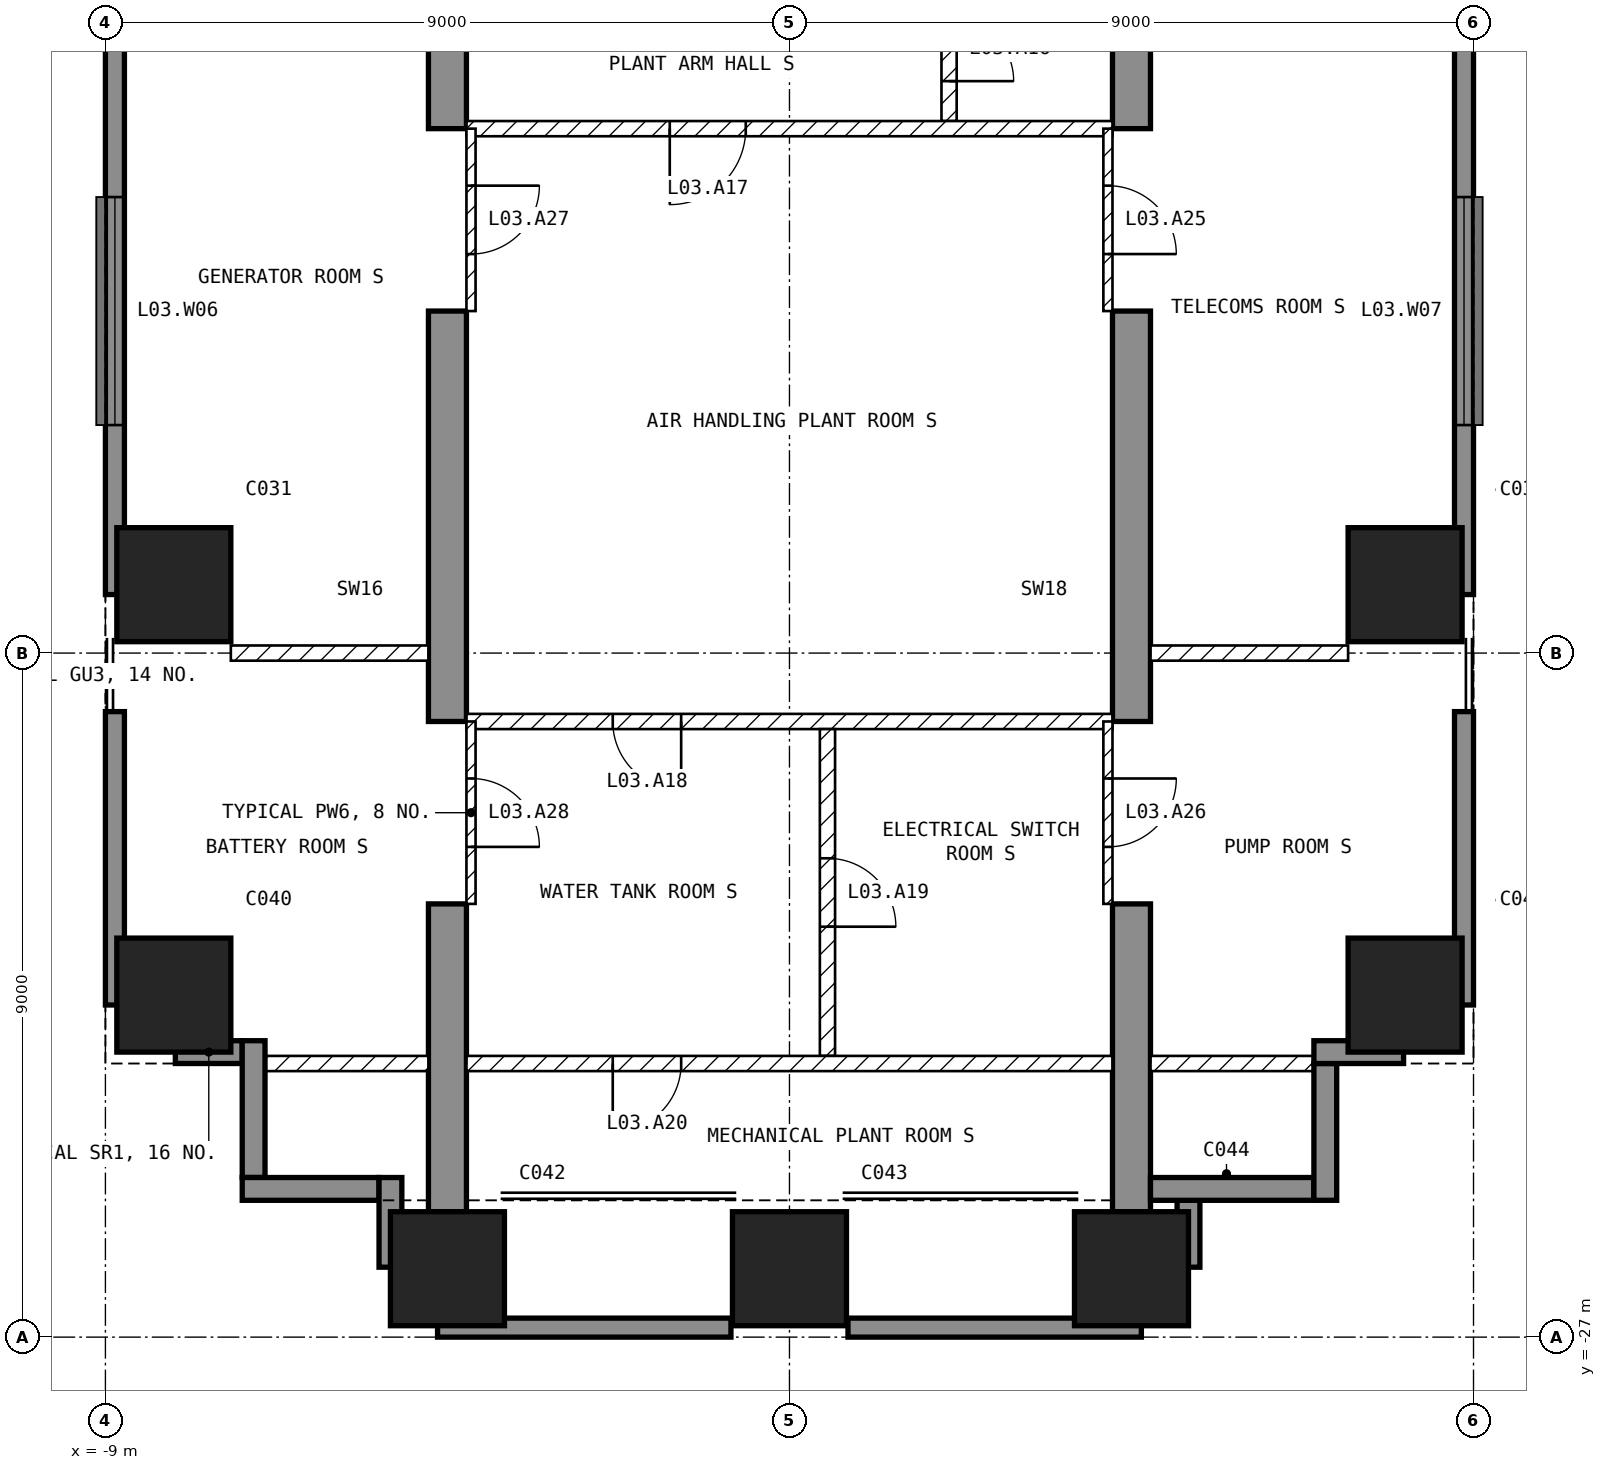
"""IFC4 building model, lengths in metres.
Left out: names, types, materials, properties, quantities, classifications, styles, units other than length and angle.
Written with IfcOpenShell. Run it as: python <this file> out.ifc"""

import sys

from ifc_helpers import new_model, si_unit, direction, frame, frame_2d, origin, origin_2d, place, context, subcontext, project, spatial, polyline, rectangle, outline, extrude, element, fill, save


model = new_model("IFC4")
c1 = context("Model", 3, precision=1e-05, world=origin(), true_north=direction((0.0, 1.0)))
c2 = subcontext(c1, "Body", "Model", "MODEL_VIEW")
j1 = project(units=[si_unit("LENGTHUNIT", "METRE"), si_unit("PLANEANGLEUNIT", "RADIAN")], contexts=[c1])
p1 = place(None, origin())
s1 = spatial("IfcSite", under=j1, at=p1, CompositionType="ELEMENT")
p2 = place(p1, origin())
s2 = spatial("IfcBuilding", under=s1, at=p2, CompositionType="ELEMENT")
p3 = place(p2, frame((0.0, 0.0, 27.0)))
s3 = spatial("IfcBuildingStorey", under=s2, at=p3, CompositionType="ELEMENT", Elevation=27.0)
for number, where, z_axis, x_axis in (
    (1, (-8.1, -22.5, -0.45), (0.0, 0.0, 1.0), (1.0, 0.0, 0.0)),
    (2, (-8.1, -17.1, -0.45), (0.0, 0.0, 1.0), (1.0, 0.0, 0.0)),
    (3, (-4.5, -26.1, -0.45), (0.0, 0.0, 1.0), (1.0, 0.0, 0.0)),
    (4, (0.0, -26.1, -0.45), (0.0, 0.0, 1.0), (1.0, 0.0, 0.0)),
    (5, (4.5, -26.1, -0.45), (0.0, 0.0, 1.0), (1.0, 0.0, 0.0)),
    (6, (8.1, -22.5, -0.45), (0.0, 0.0, 1.0), (1.0, 0.0, 0.0)),
    (7, (8.1, -17.1, -0.45), (0.0, 0.0, 1.0), (1.0, 0.0, 0.0)),
):
    element("IfcColumn", number, at=place(p3, frame(where, z_axis=z_axis, x_axis=x_axis)), inside=s3, PredefinedType="COLUMN", context=c2, shape_type="SweptSolid", body=[
        extrude(rectangle(XDim=1.5, YDim=1.5, at=origin_2d()), origin(), (0.0, 0.0, 1.0), 5.15),
    ])
for number, where, z_axis, x_axis in (
    (8, (-4.75, -25.35, -0.45), (1.0, 0.0, 0.0), (0.0, 1.0, 0.0)),
    (9, (4.25, -25.35, -0.45), (1.0, 0.0, 0.0), (0.0, 1.0, 0.0)),
):
    element("IfcWall", number, at=place(p3, frame(where, z_axis=z_axis, x_axis=x_axis)), inside=s3, PredefinedType="SHEAR", context=c2, shape_type="SweptSolid", body=[
        extrude(outline(polyline([(0.0, 0.0), (4.05, 0.0), (4.05, 2.85), (6.45, 2.85), (6.45, 0.0), (11.85, 0.0), (11.85, 2.85), (14.25, 2.85), (14.25, 0.0), (16.35, 0.0), (16.35, 5.15), (0.0, 5.15), (0.0, 0.0)])), origin(), (0.0, 0.0, 1.0), 0.5),
    ])
p4 = place(p3, frame((-8.875, -9.77, 0.0), z_axis=(0.0, 0.0, 1.0), x_axis=(0.0, -1.0, 0.0)))
e10 = element("IfcWall", 10, at=p4, inside=s3, PredefinedType="SOLIDWALL", context=c2, shape_type="SweptSolid", body=[
    extrude(rectangle(XDim=7.46, YDim=0.25, at=frame_2d((3.73, 0.0))), origin(), (0.0, 0.0, 1.0), 4.7),
])
p5 = place(p4, frame((2.23, 0.0, 1.0)))
e11 = element("IfcOpeningElement", 11, at=p5, cuts=e10, PredefinedType="OPENING", context=c2, shape_type="SweptSolid", body=[
    extrude(rectangle(XDim=3.0, YDim=2.4, at=frame_2d((1.5, 1.2))), frame((0.0, 0.135, 0.0), z_axis=(0.0, -1.0, 0.0), x_axis=(1.0, 0.0, 0.0)), (0.0, 0.0, 1.0), 0.27),
])
for number, where, z_axis, x_axis in (
    (12, (-8.875, -18.77, 0.0), (0.0, 0.0, 1.0), (0.0, -1.0, 0.0)),
    (13, (-4.63, -26.875, 0.0), (0.0, 0.0, 1.0), (1.0, 0.0, 0.0)),
    (14, (0.77, -26.875, 0.0), (0.0, 0.0, 1.0), (1.0, 0.0, 0.0)),
    (15, (8.875, -22.63, 0.0), (0.0, 0.0, 1.0), (0.0, 1.0, 0.0)),
):
    element("IfcWall", number, at=place(p3, frame(where, z_axis=z_axis, x_axis=x_axis)), inside=s3, PredefinedType="SOLIDWALL", context=c2, shape_type="SweptSolid", body=[
        extrude(rectangle(XDim=3.86, YDim=0.25, at=frame_2d((1.93, 0.0))), origin(), (0.0, 0.0, 1.0), 4.7),
    ])
p6 = place(p3, frame((8.875, -17.23, 0.0), z_axis=(0.0, 0.0, 1.0), x_axis=(0.0, 1.0, 0.0)))
e16 = element("IfcWall", 16, at=p6, inside=s3, PredefinedType="SOLIDWALL", context=c2, shape_type="SweptSolid", body=[
    extrude(rectangle(XDim=7.46, YDim=0.25, at=frame_2d((3.73, 0.0))), origin(), (0.0, 0.0, 1.0), 4.7),
])
p7 = place(p6, frame((2.23, 0.0, 1.0)))
e17 = element("IfcOpeningElement", 17, at=p7, cuts=e16, PredefinedType="OPENING", context=c2, shape_type="SweptSolid", body=[
    extrude(rectangle(XDim=3.0, YDim=2.4, at=frame_2d((1.5, 1.2))), frame((0.0, 0.135, 0.0), z_axis=(0.0, -1.0, 0.0), x_axis=(1.0, 0.0, 0.0)), (0.0, 0.0, 1.0), 0.27),
])
p8 = place(p3, frame((5.25, -26.08, 0.0), z_axis=(0.0, 0.0, 1.0), x_axis=(0.0, 1.0, 0.0)))
e18 = element("IfcWall", 18, at=p8, inside=s3, PredefinedType="SOLIDWALL", context=c2, shape_type="SweptSolid", body=[
    extrude(rectangle(XDim=0.88, YDim=0.3, at=frame_2d((0.44, 0.0))), origin(), (0.0, 0.0, 1.0), 4.7),
])
p9 = place(p3, frame((4.75, -25.05, 0.0), z_axis=(0.0, 0.0, 1.0), x_axis=(1.0, 0.0, 0.0)))
e19 = element("IfcWall", 19, at=p9, inside=s3, PredefinedType="SOLIDWALL", context=c2, shape_type="SweptSolid", body=[
    extrude(rectangle(XDim=2.15, YDim=0.3, at=frame_2d((1.075, 0.0))), origin(), (0.0, 0.0, 1.0), 4.7),
])
p10 = place(p3, frame((7.05, -25.2, 0.0), z_axis=(0.0, 0.0, 1.0), x_axis=(0.0, 1.0, 0.0)))
e20 = element("IfcWall", 20, at=p10, inside=s3, PredefinedType="SOLIDWALL", context=c2, shape_type="SweptSolid", body=[
    extrude(rectangle(XDim=1.8, YDim=0.3, at=frame_2d((0.9, 0.0))), origin(), (0.0, 0.0, 1.0), 4.7),
])
p11 = place(p3, frame((6.9, -23.25, 0.0), z_axis=(0.0, 0.0, 1.0), x_axis=(1.0, 0.0, 0.0)))
e21 = element("IfcWall", 21, at=p11, inside=s3, PredefinedType="SOLIDWALL", context=c2, shape_type="SweptSolid", body=[
    extrude(rectangle(XDim=1.18, YDim=0.3, at=frame_2d((0.59, 0.0))), origin(), (0.0, 0.0, 1.0), 4.7),
])
p12 = place(p3, frame((-8.08, -23.25, 0.0), z_axis=(0.0, 0.0, 1.0), x_axis=(1.0, 0.0, 0.0)))
e22 = element("IfcWall", 22, at=p12, inside=s3, PredefinedType="SOLIDWALL", context=c2, shape_type="SweptSolid", body=[
    extrude(rectangle(XDim=0.88, YDim=0.3, at=frame_2d((0.44, 0.0))), origin(), (0.0, 0.0, 1.0), 4.7),
])
p13 = place(p3, frame((-7.05, -23.1, 0.0), z_axis=(0.0, 0.0, 1.0), x_axis=(0.0, -1.0, 0.0)))
e23 = element("IfcWall", 23, at=p13, inside=s3, PredefinedType="SOLIDWALL", context=c2, shape_type="SweptSolid", body=[
    extrude(rectangle(XDim=1.8, YDim=0.3, at=frame_2d((0.9, 0.0))), origin(), (0.0, 0.0, 1.0), 4.7),
])
p14 = place(p3, frame((-7.2, -25.05, 0.0), z_axis=(0.0, 0.0, 1.0), x_axis=(1.0, 0.0, 0.0)))
e24 = element("IfcWall", 24, at=p14, inside=s3, PredefinedType="SOLIDWALL", context=c2, shape_type="SweptSolid", body=[
    extrude(rectangle(XDim=1.8, YDim=0.3, at=frame_2d((0.9, 0.0))), origin(), (0.0, 0.0, 1.0), 4.7),
])
p15 = place(p3, frame((-5.25, -24.9, 0.0), z_axis=(0.0, 0.0, 1.0), x_axis=(0.0, -1.0, 0.0)))
e25 = element("IfcWall", 25, at=p15, inside=s3, PredefinedType="SOLIDWALL", context=c2, shape_type="SweptSolid", body=[
    extrude(rectangle(XDim=1.18, YDim=0.3, at=frame_2d((0.59, 0.0))), origin(), (0.0, 0.0, 1.0), 4.7),
])
p16 = place(p3, frame((2.1, -9.1, 0.0), z_axis=(0.0, 0.0, 1.0), x_axis=(0.0, -1.0, 0.0)))
e26 = element("IfcWall", 26, at=p16, inside=s3, PredefinedType="PARTITIONING", context=c2, shape_type="SweptSolid", body=[
    extrude(rectangle(XDim=1.9, YDim=0.2, at=frame_2d((0.95, 0.0))), origin(), (0.0, 0.0, 1.0), 4.7),
])
p17 = place(p16, frame((0.525, 0.0, 0.0)))
e27 = element("IfcOpeningElement", 27, at=p17, cuts=e26, PredefinedType="OPENING", context=c2, shape_type="SweptSolid", body=[
    extrude(rectangle(XDim=0.85, YDim=2.1, at=frame_2d((0.425, 1.05))), frame((0.0, 0.11, 0.0), z_axis=(0.0, -1.0, 0.0), x_axis=(1.0, 0.0, 0.0)), (0.0, 0.0, 1.0), 0.22),
])
p18 = place(p3, frame((4.25, -11.1, 0.0), z_axis=(0.0, 0.0, 1.0), x_axis=(-1.0, 0.0, 0.0)))
e28 = element("IfcWall", 28, at=p18, inside=s3, PredefinedType="PARTITIONING", context=c2, shape_type="SweptSolid", body=[
    extrude(rectangle(XDim=8.5, YDim=0.2, at=frame_2d((4.25, 0.0))), origin(), (0.0, 0.0, 1.0), 4.7),
])
p19 = place(p18, frame((4.825, 0.0, 0.0)))
e29 = element("IfcOpeningElement", 29, at=p19, cuts=e28, PredefinedType="OPENING", context=c2, shape_type="SweptSolid", body=[
    extrude(rectangle(XDim=1.0, YDim=2.1, at=frame_2d((0.5, 1.05))), frame((0.0, 0.11, 0.0), z_axis=(0.0, -1.0, 0.0), x_axis=(1.0, 0.0, 0.0)), (0.0, 0.0, 1.0), 0.22),
])
p20 = place(p3, frame((4.25, -18.9, 0.0), z_axis=(0.0, 0.0, 1.0), x_axis=(-1.0, 0.0, 0.0)))
e30 = element("IfcWall", 30, at=p20, inside=s3, PredefinedType="PARTITIONING", context=c2, shape_type="SweptSolid", body=[
    extrude(rectangle(XDim=8.5, YDim=0.2, at=frame_2d((4.25, 0.0))), origin(), (0.0, 0.0, 1.0), 4.7),
])
p21 = place(p20, frame((5.675, 0.0, 0.0)))
e31 = element("IfcOpeningElement", 31, at=p21, cuts=e30, PredefinedType="OPENING", context=c2, shape_type="SweptSolid", body=[
    extrude(rectangle(XDim=0.9, YDim=2.1, at=frame_2d((0.45, 1.05))), frame((0.0, 0.11, 0.0), z_axis=(0.0, -1.0, 0.0), x_axis=(1.0, 0.0, 0.0)), (0.0, 0.0, 1.0), 0.22),
])
p22 = place(p3, frame((0.5, -19.0, 0.0), z_axis=(0.0, 0.0, 1.0), x_axis=(0.0, -1.0, 0.0)))
e32 = element("IfcWall", 32, at=p22, inside=s3, PredefinedType="PARTITIONING", context=c2, shape_type="SweptSolid", body=[
    extrude(rectangle(XDim=4.3, YDim=0.2, at=frame_2d((2.15, 0.0))), origin(), (0.0, 0.0, 1.0), 4.7),
])
p23 = place(p22, frame((1.7, 0.0, 0.0)))
e33 = element("IfcOpeningElement", 33, at=p23, cuts=e32, PredefinedType="OPENING", context=c2, shape_type="SweptSolid", body=[
    extrude(rectangle(XDim=0.9, YDim=2.1, at=frame_2d((0.45, 1.05))), frame((0.0, 0.11, 0.0), z_axis=(0.0, -1.0, 0.0), x_axis=(1.0, 0.0, 0.0)), (0.0, 0.0, 1.0), 0.22),
])
p24 = place(p3, frame((4.25, -23.4, 0.0), z_axis=(0.0, 0.0, 1.0), x_axis=(-1.0, 0.0, 0.0)))
e34 = element("IfcWall", 34, at=p24, inside=s3, PredefinedType="PARTITIONING", context=c2, shape_type="SweptSolid", body=[
    extrude(rectangle(XDim=8.5, YDim=0.2, at=frame_2d((4.25, 0.0))), origin(), (0.0, 0.0, 1.0), 4.7),
])
p25 = place(p24, frame((5.675, 0.0, 0.0)))
e35 = element("IfcOpeningElement", 35, at=p25, cuts=e34, PredefinedType="OPENING", context=c2, shape_type="SweptSolid", body=[
    extrude(rectangle(XDim=0.9, YDim=2.1, at=frame_2d((0.45, 1.05))), frame((0.0, 0.11, 0.0), z_axis=(0.0, -1.0, 0.0), x_axis=(1.0, 0.0, 0.0)), (0.0, 0.0, 1.0), 0.22),
])
p26 = place(p3, frame((7.35, -18.0, 0.0), z_axis=(0.0, 0.0, 1.0), x_axis=(-1.0, 0.0, 0.0)))
e36 = element("IfcWall", 36, at=p26, inside=s3, PredefinedType="PARTITIONING", context=c2, shape_type="SweptSolid", body=[
    extrude(rectangle(XDim=2.6, YDim=0.2, at=frame_2d((1.3, 0.0))), origin(), (0.0, 0.0, 1.0), 4.7),
])
p27 = place(p3, frame((6.9, -23.4, 0.0), z_axis=(0.0, 0.0, 1.0), x_axis=(-1.0, 0.0, 0.0)))
e37 = element("IfcWall", 37, at=p27, inside=s3, PredefinedType="PARTITIONING", context=c2, shape_type="SweptSolid", body=[
    extrude(rectangle(XDim=2.15, YDim=0.2, at=frame_2d((1.075, 0.0))), origin(), (0.0, 0.0, 1.0), 4.7),
])
p28 = place(p3, frame((-4.75, -18.0, 0.0), z_axis=(0.0, 0.0, 1.0), x_axis=(-1.0, 0.0, 0.0)))
e38 = element("IfcWall", 38, at=p28, inside=s3, PredefinedType="PARTITIONING", context=c2, shape_type="SweptSolid", body=[
    extrude(rectangle(XDim=2.6, YDim=0.2, at=frame_2d((1.3, 0.0))), origin(), (0.0, 0.0, 1.0), 4.7),
])
p29 = place(p3, frame((-4.75, -23.4, 0.0), z_axis=(0.0, 0.0, 1.0), x_axis=(-1.0, 0.0, 0.0)))
e39 = element("IfcWall", 39, at=p29, inside=s3, PredefinedType="PARTITIONING", context=c2, shape_type="SweptSolid", body=[
    extrude(rectangle(XDim=2.15, YDim=0.2, at=frame_2d((1.075, 0.0))), origin(), (0.0, 0.0, 1.0), 4.7),
])
p30 = place(p3, frame((4.19, -11.1, 0.0), z_axis=(0.0, 0.0, 1.0), x_axis=(0.0, -1.0, 0.0)))
e40 = element("IfcWall", 40, at=p30, inside=s3, PredefinedType="PARTITIONING", context=c2, shape_type="SweptSolid", body=[
    extrude(rectangle(XDim=2.4, YDim=0.12, at=frame_2d((1.2, 0.0))), origin(), (0.0, 0.0, 1.0), 2.4),
])
p31 = place(p30, frame((0.75, 0.0, 0.0)))
e41 = element("IfcOpeningElement", 41, at=p31, cuts=e40, PredefinedType="OPENING", context=c2, shape_type="SweptSolid", body=[
    extrude(rectangle(XDim=0.9, YDim=2.1, at=frame_2d((0.45, 1.05))), frame((0.0, 0.07, 0.0), z_axis=(0.0, -1.0, 0.0), x_axis=(1.0, 0.0, 0.0)), (0.0, 0.0, 1.0), 0.14),
])
p32 = place(p3, frame((4.19, -18.9, 0.0), z_axis=(0.0, 0.0, 1.0), x_axis=(0.0, -1.0, 0.0)))
e42 = element("IfcWall", 42, at=p32, inside=s3, PredefinedType="PARTITIONING", context=c2, shape_type="SweptSolid", body=[
    extrude(rectangle(XDim=2.4, YDim=0.12, at=frame_2d((1.2, 0.0))), origin(), (0.0, 0.0, 1.0), 2.4),
])
p33 = place(p32, frame((0.75, 0.0, 0.0)))
e43 = element("IfcOpeningElement", 43, at=p33, cuts=e42, PredefinedType="OPENING", context=c2, shape_type="SweptSolid", body=[
    extrude(rectangle(XDim=0.9, YDim=2.1, at=frame_2d((0.45, 1.05))), frame((0.0, 0.07, 0.0), z_axis=(0.0, -1.0, 0.0), x_axis=(1.0, 0.0, 0.0)), (0.0, 0.0, 1.0), 0.14),
])
p34 = place(p3, frame((-4.19, -11.1, 0.0), z_axis=(0.0, 0.0, 1.0), x_axis=(0.0, -1.0, 0.0)))
e44 = element("IfcWall", 44, at=p34, inside=s3, PredefinedType="PARTITIONING", context=c2, shape_type="SweptSolid", body=[
    extrude(rectangle(XDim=2.4, YDim=0.12, at=frame_2d((1.2, 0.0))), origin(), (0.0, 0.0, 1.0), 2.4),
])
p35 = place(p34, frame((0.75, 0.0, 0.0)))
e45 = element("IfcOpeningElement", 45, at=p35, cuts=e44, PredefinedType="OPENING", context=c2, shape_type="SweptSolid", body=[
    extrude(rectangle(XDim=0.9, YDim=2.1, at=frame_2d((0.45, 1.05))), frame((0.0, 0.07, 0.0), z_axis=(0.0, -1.0, 0.0), x_axis=(1.0, 0.0, 0.0)), (0.0, 0.0, 1.0), 0.14),
])
p36 = place(p3, frame((-4.19, -18.9, 0.0), z_axis=(0.0, 0.0, 1.0), x_axis=(0.0, -1.0, 0.0)))
e46 = element("IfcWall", 46, at=p36, inside=s3, PredefinedType="PARTITIONING", context=c2, shape_type="SweptSolid", body=[
    extrude(rectangle(XDim=2.4, YDim=0.12, at=frame_2d((1.2, 0.0))), origin(), (0.0, 0.0, 1.0), 2.4),
])
p37 = place(p36, frame((0.75, 0.0, 0.0)))
e47 = element("IfcOpeningElement", 47, at=p37, cuts=e46, PredefinedType="OPENING", context=c2, shape_type="SweptSolid", body=[
    extrude(rectangle(XDim=0.9, YDim=2.1, at=frame_2d((0.45, 1.05))), frame((0.0, 0.07, 0.0), z_axis=(0.0, -1.0, 0.0), x_axis=(1.0, 0.0, 0.0)), (0.0, 0.0, 1.0), 0.14),
])
p38 = place(p5, origin())
e48 = element("IfcWindow", 48, at=p38, inside=s3, PartitioningType="SINGLE_PANEL", PredefinedType="WINDOW", context=c2, shape_type="SweptSolid", body=[
    extrude(rectangle(XDim=3.0, YDim=2.4, at=frame_2d((1.5, 1.2))), frame((0.0, 0.03, 0.0), z_axis=(0.0, -1.0, 0.0), x_axis=(1.0, 0.0, 0.0)), (0.0, 0.0, 1.0), 0.06),
])
fill(e11, e48)
p39 = place(p7, origin())
e49 = element("IfcWindow", 49, at=p39, inside=s3, PartitioningType="SINGLE_PANEL", PredefinedType="WINDOW", context=c2, shape_type="SweptSolid", body=[
    extrude(rectangle(XDim=3.0, YDim=2.4, at=frame_2d((1.5, 1.2))), frame((0.0, 0.03, 0.0), z_axis=(0.0, -1.0, 0.0), x_axis=(1.0, 0.0, 0.0)), (0.0, 0.0, 1.0), 0.06),
])
fill(e17, e49)
p40 = place(p17, origin())
e50 = element("IfcDoor", 50, at=p40, inside=s3, OperationType="SINGLE_SWING_RIGHT", PredefinedType="DOOR", context=c2, shape_type="SweptSolid", body=[
    extrude(rectangle(XDim=0.85, YDim=2.1, at=frame_2d((0.425, 1.05))), frame((0.0, 0.025, 0.0), z_axis=(0.0, -1.0, 0.0), x_axis=(1.0, 0.0, 0.0)), (0.0, 0.0, 1.0), 0.05),
])
fill(e27, e50)
p41 = place(p19, origin())
e51 = element("IfcDoor", 51, at=p41, inside=s3, OperationType="SINGLE_SWING_RIGHT", PredefinedType="DOOR", context=c2, shape_type="SweptSolid", body=[
    extrude(rectangle(XDim=1.0, YDim=2.1, at=frame_2d((0.5, 1.05))), frame((0.0, 0.025, 0.0), z_axis=(0.0, -1.0, 0.0), x_axis=(1.0, 0.0, 0.0)), (0.0, 0.0, 1.0), 0.05),
])
fill(e29, e51)
p42 = place(p21, origin())
e52 = element("IfcDoor", 52, at=p42, inside=s3, OperationType="SINGLE_SWING_LEFT", PredefinedType="DOOR", context=c2, shape_type="SweptSolid", body=[
    extrude(rectangle(XDim=0.9, YDim=2.1, at=frame_2d((0.45, 1.05))), frame((0.0, 0.025, 0.0), z_axis=(0.0, -1.0, 0.0), x_axis=(1.0, 0.0, 0.0)), (0.0, 0.0, 1.0), 0.05),
])
fill(e31, e52)
p43 = place(p23, origin())
e53 = element("IfcDoor", 53, at=p43, inside=s3, OperationType="SINGLE_SWING_RIGHT", PredefinedType="DOOR", context=c2, shape_type="SweptSolid", body=[
    extrude(rectangle(XDim=0.9, YDim=2.1, at=frame_2d((0.45, 1.05))), frame((0.0, 0.025, 0.0), z_axis=(0.0, -1.0, 0.0), x_axis=(1.0, 0.0, 0.0)), (0.0, 0.0, 1.0), 0.05),
])
fill(e33, e53)
p44 = place(p25, origin())
e54 = element("IfcDoor", 54, at=p44, inside=s3, OperationType="SINGLE_SWING_RIGHT", PredefinedType="DOOR", context=c2, shape_type="SweptSolid", body=[
    extrude(rectangle(XDim=0.9, YDim=2.1, at=frame_2d((0.45, 1.05))), frame((0.0, 0.025, 0.0), z_axis=(0.0, -1.0, 0.0), x_axis=(1.0, 0.0, 0.0)), (0.0, 0.0, 1.0), 0.05),
])
fill(e35, e54)
p45 = place(p31, origin())
e55 = element("IfcDoor", 55, at=p45, inside=s3, OperationType="SINGLE_SWING_RIGHT", PredefinedType="DOOR", context=c2, shape_type="SweptSolid", body=[
    extrude(rectangle(XDim=0.9, YDim=2.1, at=frame_2d((0.45, 1.05))), frame((0.0, 0.025, 0.0), z_axis=(0.0, -1.0, 0.0), x_axis=(1.0, 0.0, 0.0)), (0.0, 0.0, 1.0), 0.05),
])
fill(e41, e55)
p46 = place(p33, origin())
e56 = element("IfcDoor", 56, at=p46, inside=s3, OperationType="SINGLE_SWING_LEFT", PredefinedType="DOOR", context=c2, shape_type="SweptSolid", body=[
    extrude(rectangle(XDim=0.9, YDim=2.1, at=frame_2d((0.45, 1.05))), frame((0.0, 0.025, 0.0), z_axis=(0.0, -1.0, 0.0), x_axis=(1.0, 0.0, 0.0)), (0.0, 0.0, 1.0), 0.05),
])
fill(e43, e56)
p47 = place(p35, origin())
e57 = element("IfcDoor", 57, at=p47, inside=s3, OperationType="SINGLE_SWING_LEFT", PredefinedType="DOOR", context=c2, shape_type="SweptSolid", body=[
    extrude(rectangle(XDim=0.9, YDim=2.1, at=frame_2d((0.45, 1.05))), frame((0.0, 0.025, 0.0), z_axis=(0.0, -1.0, 0.0), x_axis=(1.0, 0.0, 0.0)), (0.0, 0.0, 1.0), 0.05),
])
fill(e45, e57)
p48 = place(p37, origin())
e58 = element("IfcDoor", 58, at=p48, inside=s3, OperationType="SINGLE_SWING_RIGHT", PredefinedType="DOOR", context=c2, shape_type="SweptSolid", body=[
    extrude(rectangle(XDim=0.9, YDim=2.1, at=frame_2d((0.45, 1.05))), frame((0.0, 0.025, 0.0), z_axis=(0.0, -1.0, 0.0), x_axis=(1.0, 0.0, 0.0)), (0.0, 0.0, 1.0), 0.05),
])
fill(e47, e58)
save(model, sys.argv[1])
